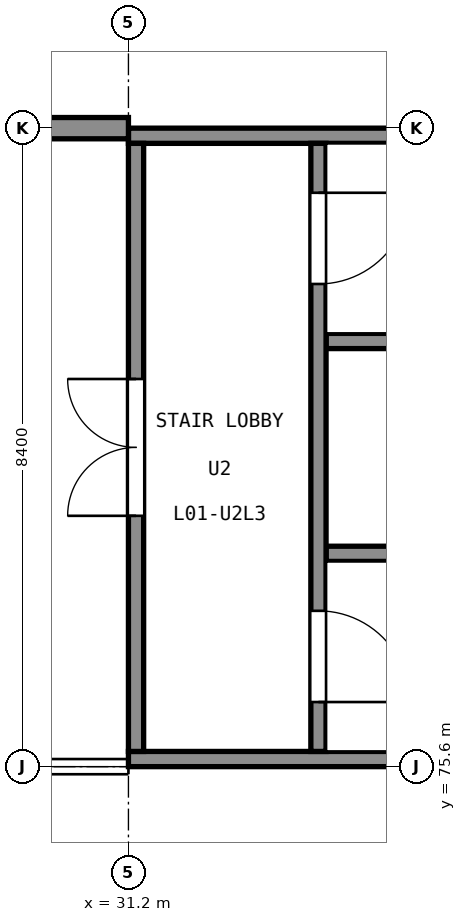
"""IFC4 building model, lengths in metres.
Left out: names, types, materials, properties, quantities, classifications, styles, units other than length and angle.
Written with IfcOpenShell. Run it as: python <this file> out.ifc"""

import sys

from ifc_helpers import new_model, si_unit, direction, frame, frame_2d, origin, place, context, subcontext, project, spatial, polyline, rectangle, outline, extrude, element, fill, save


model = new_model("IFC4")
c1 = context("Model", 3, precision=1e-05, world=origin(), true_north=direction((0.0, 1.0)))
c2 = subcontext(c1, "Body", "Model", "MODEL_VIEW")
j1 = project(units=[si_unit("LENGTHUNIT", "METRE"), si_unit("PLANEANGLEUNIT", "RADIAN")], contexts=[c1])
p1 = place(None, origin())
s1 = spatial("IfcSite", under=j1, at=p1, CompositionType="ELEMENT")
p2 = place(p1, origin())
s2 = spatial("IfcBuilding", under=s1, at=p2, CompositionType="ELEMENT")
p3 = place(p2, frame((0.0, 0.0, 5.5)))
s3 = spatial("IfcBuildingStorey", under=s2, at=p3, CompositionType="ELEMENT", Elevation=5.5)
p4 = place(p3, frame((31.2, 75.7, 0.0), z_axis=(0.0, 0.0, 1.0), x_axis=(1.0, 0.0, 0.0)))
e1 = element("IfcWall", 1, at=p4, inside=s3, PredefinedType="SHEAR", context=c2, shape_type="SweptSolid", body=[
    extrude(rectangle(XDim=8.4, YDim=0.2, at=frame_2d((4.2, 0.0))), origin(), (0.0, 0.0, 1.0), 5.625),
])
p5 = place(p3, frame((31.2, 83.9, 0.0), z_axis=(0.0, 0.0, 1.0), x_axis=(1.0, 0.0, 0.0)))
e2 = element("IfcWall", 2, at=p5, inside=s3, PredefinedType="SHEAR", context=c2, shape_type="SweptSolid", body=[
    extrude(rectangle(XDim=8.4, YDim=0.2, at=frame_2d((4.2, 0.0))), origin(), (0.0, 0.0, 1.0), 7.7),
])
p6 = place(p3, frame((31.3, 75.8, 0.0), z_axis=(0.0, 0.0, 1.0), x_axis=(0.0, 1.0, 0.0)))
e3 = element("IfcWall", 3, at=p6, inside=s3, PredefinedType="SHEAR", context=c2, shape_type="SweptSolid", body=[
    extrude(outline(polyline([(0.0, 0.0), (8.0, 0.0), (8.0, 7.674), (7.407, 7.524), (7.111, 7.45), (0.889, 5.875), (0.593, 5.801), (0.0, 5.651), (0.0, 0.0)])), frame((0.0, 0.1, 0.0), z_axis=(0.0, -1.0, 0.0), x_axis=(1.0, 0.0, 0.0)), (0.0, 0.0, 1.0), 0.2),
])
p7 = place(p6, frame((3.1, 0.0, 0.0)))
e4 = element("IfcOpeningElement", 4, at=p7, cuts=e3, PredefinedType="OPENING", context=c2, shape_type="SweptSolid", body=[
    extrude(rectangle(XDim=1.8, YDim=2.1, at=frame_2d((0.9, 1.05))), frame((0.0, 0.11, 0.0), z_axis=(0.0, -1.0, 0.0), x_axis=(1.0, 0.0, 0.0)), (0.0, 0.0, 1.0), 0.22),
])
p8 = place(p3, frame((33.7, 75.8, 0.0), z_axis=(0.0, 0.0, 1.0), x_axis=(0.0, 1.0, 0.0)))
e5 = element("IfcWall", 5, at=p8, inside=s3, PredefinedType="SHEAR", context=c2, shape_type="SweptSolid", body=[
    extrude(outline(polyline([(0.0, 0.0), (8.0, 0.0), (8.0, 7.674), (7.407, 7.524), (7.111, 7.45), (0.889, 5.875), (0.593, 5.801), (0.0, 5.651), (0.0, 0.0)])), frame((0.0, 0.1, 0.0), z_axis=(0.0, -1.0, 0.0), x_axis=(1.0, 0.0, 0.0)), (0.0, 0.0, 1.0), 0.2),
])
p9 = place(p8, frame((0.65, 0.0, 0.0)))
e6 = element("IfcOpeningElement", 6, at=p9, cuts=e5, PredefinedType="OPENING", context=c2, shape_type="SweptSolid", body=[
    extrude(rectangle(XDim=1.2, YDim=2.1, at=frame_2d((0.6, 1.05))), frame((0.0, 0.11, 0.0), z_axis=(0.0, -1.0, 0.0), x_axis=(1.0, 0.0, 0.0)), (0.0, 0.0, 1.0), 0.22),
])
p10 = place(p8, frame((6.15, 0.0, 0.0)))
e7 = element("IfcOpeningElement", 7, at=p10, cuts=e5, PredefinedType="OPENING", context=c2, shape_type="SweptSolid", body=[
    extrude(rectangle(XDim=1.2, YDim=2.1, at=frame_2d((0.6, 1.05))), frame((0.0, 0.11, 0.0), z_axis=(0.0, -1.0, 0.0), x_axis=(1.0, 0.0, 0.0)), (0.0, 0.0, 1.0), 0.22),
])
p11 = place(p3, frame((33.8, 78.4, 0.0), z_axis=(0.0, 0.0, 1.0), x_axis=(1.0, 0.0, 0.0)))
e8 = element("IfcWall", 8, at=p11, inside=s3, PredefinedType="SHEAR", context=c2, shape_type="SweptSolid", body=[
    extrude(rectangle(XDim=5.6, YDim=0.2, at=frame_2d((2.8, 0.0))), origin(), (0.0, 0.0, 1.0), 6.308),
])
p12 = place(p3, frame((33.8, 81.2, 0.0), z_axis=(0.0, 0.0, 1.0), x_axis=(1.0, 0.0, 0.0)))
e9 = element("IfcWall", 9, at=p12, inside=s3, PredefinedType="SHEAR", context=c2, shape_type="SweptSolid", body=[
    extrude(rectangle(XDim=5.6, YDim=0.2, at=frame_2d((2.8, 0.0))), origin(), (0.0, 0.0, 1.0), 7.018),
])
p13 = place(p3, frame((23.2, 84.0, 0.0), z_axis=(0.0, 0.0, 1.0), x_axis=(1.0, 0.0, 0.0)))
e10 = element("IfcWall", 10, at=p13, inside=s3, PredefinedType="SOLIDWALL", context=c2, shape_type="SweptSolid", body=[
    extrude(rectangle(XDim=8.0, YDim=0.28, at=frame_2d((4.0, 0.0))), origin(), (0.0, 0.0, 1.0), 7.444),
])
p14 = place(p13, frame((1.05, 0.0, 1.2)))
e11 = element("IfcOpeningElement", 11, at=p14, cuts=e10, PredefinedType="OPENING", context=c2, shape_type="SweptSolid", body=[
    extrude(rectangle(XDim=0.3, YDim=3.0, at=frame_2d((0.15, 1.5))), frame((0.0, 0.15, 0.0), z_axis=(0.0, -1.0, 0.0), x_axis=(1.0, 0.0, 0.0)), (0.0, 0.0, 1.0), 0.3),
])
p15 = place(p13, frame((3.95, 0.0, 1.2)))
e12 = element("IfcOpeningElement", 12, at=p15, cuts=e10, PredefinedType="OPENING", context=c2, shape_type="SweptSolid", body=[
    extrude(rectangle(XDim=0.3, YDim=3.0, at=frame_2d((0.15, 1.5))), frame((0.0, 0.15, 0.0), z_axis=(0.0, -1.0, 0.0), x_axis=(1.0, 0.0, 0.0)), (0.0, 0.0, 1.0), 0.3),
])
p16 = place(p13, frame((6.65, 0.0, 1.2)))
e13 = element("IfcOpeningElement", 13, at=p16, cuts=e10, PredefinedType="OPENING", context=c2, shape_type="SweptSolid", body=[
    extrude(rectangle(XDim=0.3, YDim=3.0, at=frame_2d((0.15, 1.5))), frame((0.0, 0.15, 0.0), z_axis=(0.0, -1.0, 0.0), x_axis=(1.0, 0.0, 0.0)), (0.0, 0.0, 1.0), 0.3),
])
p17 = place(p13, frame((5.0, 0.0, 0.0)))
e14 = element("IfcOpeningElement", 14, at=p17, cuts=e10, PredefinedType="OPENING", context=c2, shape_type="SweptSolid", body=[
    extrude(rectangle(XDim=1.8, YDim=2.1, at=frame_2d((0.9, 1.05))), frame((0.0, 0.15, 0.0), z_axis=(0.0, -1.0, 0.0), x_axis=(1.0, 0.0, 0.0)), (0.0, 0.0, 1.0), 0.3),
])
p18 = place(p7, origin())
e15 = element("IfcDoor", 15, at=p18, inside=s3, OperationType="DOUBLE_DOOR_SINGLE_SWING", PredefinedType="DOOR", context=c2, shape_type="SweptSolid", body=[
    extrude(rectangle(XDim=1.8, YDim=2.1, at=frame_2d((0.9, 1.05))), frame((0.0, 0.025, 0.0), z_axis=(0.0, -1.0, 0.0), x_axis=(1.0, 0.0, 0.0)), (0.0, 0.0, 1.0), 0.05),
])
fill(e4, e15)
p19 = place(p9, origin())
e16 = element("IfcDoor", 16, at=p19, inside=s3, OperationType="SINGLE_SWING_LEFT", PredefinedType="DOOR", context=c2, shape_type="SweptSolid", body=[
    extrude(rectangle(XDim=1.2, YDim=2.1, at=frame_2d((0.6, 1.05))), frame((0.0, 0.025, 0.0), z_axis=(0.0, -1.0, 0.0), x_axis=(1.0, 0.0, 0.0)), (0.0, 0.0, 1.0), 0.05),
])
fill(e6, e16)
p20 = place(p10, origin())
e17 = element("IfcDoor", 17, at=p20, inside=s3, OperationType="SINGLE_SWING_RIGHT", PredefinedType="DOOR", context=c2, shape_type="SweptSolid", body=[
    extrude(rectangle(XDim=1.2, YDim=2.1, at=frame_2d((0.6, 1.05))), frame((0.0, 0.025, 0.0), z_axis=(0.0, -1.0, 0.0), x_axis=(1.0, 0.0, 0.0)), (0.0, 0.0, 1.0), 0.05),
])
fill(e7, e17)
save(model, sys.argv[1])
